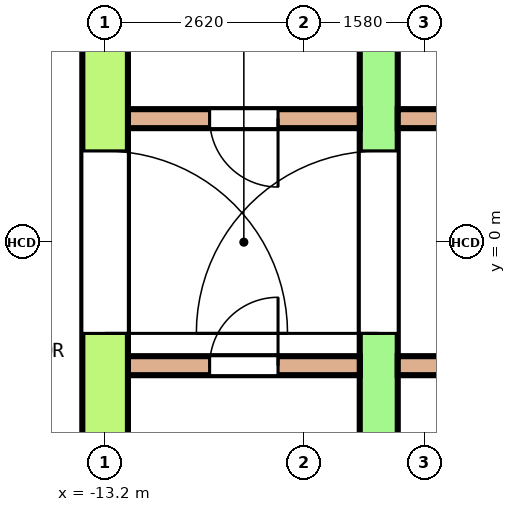
"""IFC4 building model, lengths in metres.
Left out: names, types, materials, properties, quantities, classifications, styles, units other than length and angle.
Written with IfcOpenShell. Run it as: python <this file> out.ifc"""

import sys

from ifc_helpers import new_model, si_unit, direction, frame, frame_2d, origin, place, context, subcontext, project, spatial, polyline, rectangle, outline, extrude, element, fill, save


model = new_model("IFC4")
c1 = context("Model", 3, precision=1e-05, world=origin(), true_north=direction((0.0, 1.0)))
c2 = subcontext(c1, "Body", "Model", "MODEL_VIEW")
j1 = project(units=[si_unit("LENGTHUNIT", "METRE"), si_unit("PLANEANGLEUNIT", "RADIAN")], contexts=[c1])
p1 = place(None, origin())
s1 = spatial("IfcSite", under=j1, at=p1, CompositionType="ELEMENT")
p2 = place(p1, origin())
s2 = spatial("IfcBuilding", under=s1, at=p2, CompositionType="ELEMENT")
p3 = place(p2, frame((0.0, 0.0, 241.4)))
s3 = spatial("IfcBuildingStorey", under=s2, at=p3, CompositionType="ELEMENT", Elevation=241.4)
p4 = place(p3, frame((-23.479, -2.134, 0.0), z_axis=(0.0, 0.0, 1.0), x_axis=(0.500004117472, -0.866023026548, 0.0)))
e1 = element("IfcWall", 1, at=p4, inside=s3, PredefinedType="SOLIDWALL", context=c2, shape_type="SweptSolid", body=[
    extrude(outline(polyline([(-0.027, -0.1), (1.017, -0.1), (2.061, -0.1), (3.105, -0.1), (4.149, -0.1), (5.193, -0.1), (6.237, -0.1), (7.281, -0.1), (8.325, -0.1), (9.369, -0.1), (10.414, -0.1), (11.458, -0.1), (12.501, -0.1), (13.546, -0.1), (14.59, -0.1), (15.634, -0.1), (16.678, -0.1), (17.722, -0.1), (18.766, -0.1), (19.81, -0.1), (19.756, 0.1), (18.718, 0.1), (17.679, 0.1), (16.641, 0.1), (15.603, 0.1), (14.564, 0.1), (13.526, 0.1), (12.488, 0.1), (11.449, 0.1), (10.411, 0.1), (9.372, 0.1), (8.334, 0.1), (7.295, 0.1), (6.257, 0.1), (5.219, 0.1), (4.18, 0.1), (3.142, 0.1), (2.104, 0.1), (1.065, 0.1), (0.027, 0.1), (-0.027, -0.1)])), origin(), (0.0, 0.0, 1.0), 3.7),
])
p5 = place(p4, frame((0.528, 0.0, 0.1)))
e2 = element("IfcOpeningElement", 2, at=p5, cuts=e1, PredefinedType="OPENING", context=c2, shape_type="SweptSolid", body=[
    extrude(rectangle(XDim=2.9, YDim=2.65, at=frame_2d((1.45, 1.325))), frame((0.0, 0.11, 0.0), z_axis=(0.0, -1.0, 0.0), x_axis=(1.0, 0.0, 0.0)), (0.0, 0.0, 1.0), 0.22),
])
p6 = place(p4, frame((4.485, 0.0, 0.1)))
e3 = element("IfcOpeningElement", 3, at=p6, cuts=e1, PredefinedType="OPENING", context=c2, shape_type="SweptSolid", body=[
    extrude(rectangle(XDim=2.9, YDim=2.65, at=frame_2d((1.45, 1.325))), frame((0.0, 0.11, 0.0), z_axis=(0.0, -1.0, 0.0), x_axis=(1.0, 0.0, 0.0)), (0.0, 0.0, 1.0), 0.22),
])
p7 = place(p4, frame((8.991, 0.0, 0.0)))
e4 = element("IfcOpeningElement", 4, at=p7, cuts=e1, PredefinedType="OPENING", context=c2, shape_type="SweptSolid", body=[
    extrude(rectangle(XDim=1.8, YDim=2.4, at=frame_2d((0.9, 1.2))), frame((0.0, 0.11, 0.0), z_axis=(0.0, -1.0, 0.0), x_axis=(1.0, 0.0, 0.0)), (0.0, 0.0, 1.0), 0.22),
])
p8 = place(p4, frame((8.991, 0.0, 2.55)))
e5 = element("IfcOpeningElement", 5, at=p8, cuts=e1, PredefinedType="OPENING", context=c2, shape_type="SweptSolid", body=[
    extrude(rectangle(XDim=1.8, YDim=0.2, at=frame_2d((0.9, 0.1))), frame((0.0, 0.11, 0.0), z_axis=(0.0, -1.0, 0.0), x_axis=(1.0, 0.0, 0.0)), (0.0, 0.0, 1.0), 0.22),
])
p9 = place(p4, frame((12.398, 0.0, 0.1)))
e6 = element("IfcOpeningElement", 6, at=p9, cuts=e1, PredefinedType="OPENING", context=c2, shape_type="SweptSolid", body=[
    extrude(rectangle(XDim=2.9, YDim=2.65, at=frame_2d((1.45, 1.325))), frame((0.0, 0.11, 0.0), z_axis=(0.0, -1.0, 0.0), x_axis=(1.0, 0.0, 0.0)), (0.0, 0.0, 1.0), 0.22),
])
p10 = place(p4, frame((16.355, 0.0, 0.1)))
e7 = element("IfcOpeningElement", 7, at=p10, cuts=e1, PredefinedType="OPENING", context=c2, shape_type="SweptSolid", body=[
    extrude(rectangle(XDim=2.9, YDim=2.65, at=frame_2d((1.45, 1.325))), frame((0.0, 0.11, 0.0), z_axis=(0.0, -1.0, 0.0), x_axis=(1.0, 0.0, 0.0)), (0.0, 0.0, 1.0), 0.22),
])
p11 = place(p3, frame((-13.2, -7.8, 0.0), z_axis=(0.0, 0.0, 1.0), x_axis=(0.0, 1.0, 0.0)))
e8 = element("IfcWall", 8, at=p11, inside=s3, PredefinedType="SHEAR", context=c2, shape_type="SweptSolid", body=[
    extrude(rectangle(XDim=15.6, YDim=0.6, at=frame_2d((7.8, 0.0))), origin(), (0.0, 0.0, 1.0), 3.7),
])
p12 = place(p11, frame((6.6, 0.0, 0.0)))
e9 = element("IfcOpeningElement", 9, at=p12, cuts=e8, PredefinedType="OPENING", context=c2, shape_type="SweptSolid", body=[
    extrude(rectangle(XDim=2.4, YDim=2.1, at=frame_2d((1.2, 1.05))), frame((0.0, 0.31, 0.0), z_axis=(0.0, -1.0, 0.0), x_axis=(1.0, 0.0, 0.0)), (0.0, 0.0, 1.0), 0.62),
])
p13 = place(p11, frame((13.5, 0.0, 0.0)))
e10 = element("IfcOpeningElement", 10, at=p13, cuts=e8, PredefinedType="OPENING", context=c2, shape_type="SweptSolid", body=[
    extrude(rectangle(XDim=1.2, YDim=2.1, at=frame_2d((0.6, 1.05))), frame((0.0, 0.31, 0.0), z_axis=(0.0, -1.0, 0.0), x_axis=(1.0, 0.0, 0.0)), (0.0, 0.0, 1.0), 0.62),
])
p14 = place(p11, frame((0.9, 0.0, 0.0)))
e11 = element("IfcOpeningElement", 11, at=p14, cuts=e8, PredefinedType="OPENING", context=c2, shape_type="SweptSolid", body=[
    extrude(rectangle(XDim=1.2, YDim=2.1, at=frame_2d((0.6, 1.05))), frame((0.0, 0.31, 0.0), z_axis=(0.0, -1.0, 0.0), x_axis=(1.0, 0.0, 0.0)), (0.0, 0.0, 1.0), 0.62),
])
p15 = place(p3, frame((-9.6, -7.8, 0.0), z_axis=(0.0, 0.0, 1.0), x_axis=(0.0, 1.0, 0.0)))
e12 = element("IfcWall", 12, at=p15, inside=s3, PredefinedType="SHEAR", context=c2, shape_type="SweptSolid", body=[
    extrude(rectangle(XDim=15.6, YDim=0.5, at=frame_2d((7.8, 0.0))), origin(), (0.0, 0.0, 1.0), 3.7),
])
p16 = place(p15, frame((6.6, 0.0, 0.0)))
e13 = element("IfcOpeningElement", 13, at=p16, cuts=e12, PredefinedType="OPENING", context=c2, shape_type="SweptSolid", body=[
    extrude(rectangle(XDim=2.4, YDim=2.1, at=frame_2d((1.2, 1.05))), frame((0.0, 0.26, 0.0), z_axis=(0.0, -1.0, 0.0), x_axis=(1.0, 0.0, 0.0)), (0.0, 0.0, 1.0), 0.52),
])
p17 = place(p15, frame((13.5, 0.0, 0.0)))
e14 = element("IfcOpeningElement", 14, at=p17, cuts=e12, PredefinedType="OPENING", context=c2, shape_type="SweptSolid", body=[
    extrude(rectangle(XDim=1.2, YDim=2.1, at=frame_2d((0.6, 1.05))), frame((0.0, 0.26, 0.0), z_axis=(0.0, -1.0, 0.0), x_axis=(1.0, 0.0, 0.0)), (0.0, 0.0, 1.0), 0.52),
])
p18 = place(p15, frame((0.9, 0.0, 0.0)))
e15 = element("IfcOpeningElement", 15, at=p18, cuts=e12, PredefinedType="OPENING", context=c2, shape_type="SweptSolid", body=[
    extrude(rectangle(XDim=1.2, YDim=2.1, at=frame_2d((0.6, 1.05))), frame((0.0, 0.26, 0.0), z_axis=(0.0, -1.0, 0.0), x_axis=(1.0, 0.0, 0.0)), (0.0, 0.0, 1.0), 0.52),
])
p19 = place(p3, frame((-12.9, 1.625, 0.0), z_axis=(0.0, 0.0, 1.0), x_axis=(1.0, 0.0, 0.0)))
e16 = element("IfcWall", 16, at=p19, inside=s3, PredefinedType="SOLIDWALL", context=c2, shape_type="SweptSolid", body=[
    extrude(rectangle(XDim=3.05, YDim=0.25, at=frame_2d((1.525, 0.0))), origin(), (0.0, 0.0, 1.0), 3.7),
])
p20 = place(p19, frame((1.075, 0.0, 0.0)))
e17 = element("IfcOpeningElement", 17, at=p20, cuts=e16, PredefinedType="OPENING", context=c2, shape_type="SweptSolid", body=[
    extrude(rectangle(XDim=0.9, YDim=2.1, at=frame_2d((0.45, 1.05))), frame((0.0, 0.135, 0.0), z_axis=(0.0, -1.0, 0.0), x_axis=(1.0, 0.0, 0.0)), (0.0, 0.0, 1.0), 0.27),
])
p21 = place(p3, frame((-9.35, 1.625, 0.0), z_axis=(0.0, 0.0, 1.0), x_axis=(1.0, 0.0, 0.0)))
e18 = element("IfcWall", 18, at=p21, inside=s3, PredefinedType="SOLIDWALL", context=c2, shape_type="SweptSolid", body=[
    extrude(rectangle(XDim=18.7, YDim=0.25, at=frame_2d((9.35, 0.0))), origin(), (0.0, 0.0, 1.0), 3.7),
])
p22 = place(p21, frame((7.65, 0.0, 0.0)))
e19 = element("IfcOpeningElement", 19, at=p22, cuts=e18, PredefinedType="OPENING", context=c2, shape_type="SweptSolid", body=[
    extrude(rectangle(XDim=1.1, YDim=2.1, at=frame_2d((0.55, 1.05))), frame((0.0, 0.135, 0.0), z_axis=(0.0, -1.0, 0.0), x_axis=(1.0, 0.0, 0.0)), (0.0, 0.0, 1.0), 0.27),
])
p23 = place(p21, frame((9.95, 0.0, 0.0)))
e20 = element("IfcOpeningElement", 20, at=p23, cuts=e18, PredefinedType="OPENING", context=c2, shape_type="SweptSolid", body=[
    extrude(rectangle(XDim=1.1, YDim=2.1, at=frame_2d((0.55, 1.05))), frame((0.0, 0.135, 0.0), z_axis=(0.0, -1.0, 0.0), x_axis=(1.0, 0.0, 0.0)), (0.0, 0.0, 1.0), 0.27),
])
p24 = place(p21, frame((12.4, 0.0, 0.0)))
e21 = element("IfcOpeningElement", 21, at=p24, cuts=e18, PredefinedType="OPENING", context=c2, shape_type="SweptSolid", body=[
    extrude(rectangle(XDim=1.1, YDim=2.1, at=frame_2d((0.55, 1.05))), frame((0.0, 0.135, 0.0), z_axis=(0.0, -1.0, 0.0), x_axis=(1.0, 0.0, 0.0)), (0.0, 0.0, 1.0), 0.27),
])
p25 = place(p21, frame((0.575, 0.0, 0.0)))
e22 = element("IfcOpeningElement", 22, at=p25, cuts=e18, PredefinedType="OPENING", context=c2, shape_type="SweptSolid", body=[
    extrude(rectangle(XDim=0.9, YDim=2.1, at=frame_2d((0.45, 1.05))), frame((0.0, 0.135, 0.0), z_axis=(0.0, -1.0, 0.0), x_axis=(1.0, 0.0, 0.0)), (0.0, 0.0, 1.0), 0.27),
])
p26 = place(p21, frame((2.919, 0.0, 0.0)))
e23 = element("IfcOpeningElement", 23, at=p26, cuts=e18, PredefinedType="OPENING", context=c2, shape_type="SweptSolid", body=[
    extrude(rectangle(XDim=0.9, YDim=2.1, at=frame_2d((0.45, 1.05))), frame((0.0, 0.135, 0.0), z_axis=(0.0, -1.0, 0.0), x_axis=(1.0, 0.0, 0.0)), (0.0, 0.0, 1.0), 0.27),
])
p27 = place(p21, frame((5.281, 0.0, 0.0)))
e24 = element("IfcOpeningElement", 24, at=p27, cuts=e18, PredefinedType="OPENING", context=c2, shape_type="SweptSolid", body=[
    extrude(rectangle(XDim=0.9, YDim=2.1, at=frame_2d((0.45, 1.05))), frame((0.0, 0.135, 0.0), z_axis=(0.0, -1.0, 0.0), x_axis=(1.0, 0.0, 0.0)), (0.0, 0.0, 1.0), 0.27),
])
p28 = place(p21, frame((14.9, 0.0, 0.0)))
e25 = element("IfcOpeningElement", 25, at=p28, cuts=e18, PredefinedType="OPENING", context=c2, shape_type="SweptSolid", body=[
    extrude(rectangle(XDim=0.9, YDim=2.1, at=frame_2d((0.45, 1.05))), frame((0.0, 0.135, 0.0), z_axis=(0.0, -1.0, 0.0), x_axis=(1.0, 0.0, 0.0)), (0.0, 0.0, 1.0), 0.27),
])
p29 = place(p21, frame((17.225, 0.0, 0.0)))
e26 = element("IfcOpeningElement", 26, at=p29, cuts=e18, PredefinedType="OPENING", context=c2, shape_type="SweptSolid", body=[
    extrude(rectangle(XDim=0.9, YDim=2.1, at=frame_2d((0.45, 1.05))), frame((0.0, 0.135, 0.0), z_axis=(0.0, -1.0, 0.0), x_axis=(1.0, 0.0, 0.0)), (0.0, 0.0, 1.0), 0.27),
])
p30 = place(p3, frame((-12.9, -1.625, 0.0), z_axis=(0.0, 0.0, 1.0), x_axis=(1.0, 0.0, 0.0)))
e27 = element("IfcWall", 27, at=p30, inside=s3, PredefinedType="SOLIDWALL", context=c2, shape_type="SweptSolid", body=[
    extrude(rectangle(XDim=3.05, YDim=0.25, at=frame_2d((1.525, 0.0))), origin(), (0.0, 0.0, 1.0), 3.7),
])
p31 = place(p30, frame((1.075, 0.0, 0.0)))
e28 = element("IfcOpeningElement", 28, at=p31, cuts=e27, PredefinedType="OPENING", context=c2, shape_type="SweptSolid", body=[
    extrude(rectangle(XDim=0.9, YDim=2.1, at=frame_2d((0.45, 1.05))), frame((0.0, 0.135, 0.0), z_axis=(0.0, -1.0, 0.0), x_axis=(1.0, 0.0, 0.0)), (0.0, 0.0, 1.0), 0.27),
])
p32 = place(p3, frame((-9.35, -1.625, 0.0), z_axis=(0.0, 0.0, 1.0), x_axis=(1.0, 0.0, 0.0)))
e29 = element("IfcWall", 29, at=p32, inside=s3, PredefinedType="SOLIDWALL", context=c2, shape_type="SweptSolid", body=[
    extrude(rectangle(XDim=18.7, YDim=0.25, at=frame_2d((9.35, 0.0))), origin(), (0.0, 0.0, 1.0), 3.7),
])
p33 = place(p32, frame((7.65, 0.0, 0.0)))
e30 = element("IfcOpeningElement", 30, at=p33, cuts=e29, PredefinedType="OPENING", context=c2, shape_type="SweptSolid", body=[
    extrude(rectangle(XDim=1.1, YDim=2.1, at=frame_2d((0.55, 1.05))), frame((0.0, 0.135, 0.0), z_axis=(0.0, -1.0, 0.0), x_axis=(1.0, 0.0, 0.0)), (0.0, 0.0, 1.0), 0.27),
])
p34 = place(p32, frame((9.95, 0.0, 0.0)))
e31 = element("IfcOpeningElement", 31, at=p34, cuts=e29, PredefinedType="OPENING", context=c2, shape_type="SweptSolid", body=[
    extrude(rectangle(XDim=1.1, YDim=2.1, at=frame_2d((0.55, 1.05))), frame((0.0, 0.135, 0.0), z_axis=(0.0, -1.0, 0.0), x_axis=(1.0, 0.0, 0.0)), (0.0, 0.0, 1.0), 0.27),
])
p35 = place(p32, frame((12.4, 0.0, 0.0)))
e32 = element("IfcOpeningElement", 32, at=p35, cuts=e29, PredefinedType="OPENING", context=c2, shape_type="SweptSolid", body=[
    extrude(rectangle(XDim=1.1, YDim=2.1, at=frame_2d((0.55, 1.05))), frame((0.0, 0.135, 0.0), z_axis=(0.0, -1.0, 0.0), x_axis=(1.0, 0.0, 0.0)), (0.0, 0.0, 1.0), 0.27),
])
p36 = place(p32, frame((0.575, 0.0, 0.0)))
e33 = element("IfcOpeningElement", 33, at=p36, cuts=e29, PredefinedType="OPENING", context=c2, shape_type="SweptSolid", body=[
    extrude(rectangle(XDim=0.9, YDim=2.1, at=frame_2d((0.45, 1.05))), frame((0.0, 0.135, 0.0), z_axis=(0.0, -1.0, 0.0), x_axis=(1.0, 0.0, 0.0)), (0.0, 0.0, 1.0), 0.27),
])
p37 = place(p32, frame((2.519, 0.0, 0.0)))
e34 = element("IfcOpeningElement", 34, at=p37, cuts=e29, PredefinedType="OPENING", context=c2, shape_type="SweptSolid", body=[
    extrude(rectangle(XDim=0.9, YDim=2.1, at=frame_2d((0.45, 1.05))), frame((0.0, 0.135, 0.0), z_axis=(0.0, -1.0, 0.0), x_axis=(1.0, 0.0, 0.0)), (0.0, 0.0, 1.0), 0.27),
])
p38 = place(p32, frame((4.881, 0.0, 0.0)))
e35 = element("IfcOpeningElement", 35, at=p38, cuts=e29, PredefinedType="OPENING", context=c2, shape_type="SweptSolid", body=[
    extrude(rectangle(XDim=0.9, YDim=2.1, at=frame_2d((0.45, 1.05))), frame((0.0, 0.135, 0.0), z_axis=(0.0, -1.0, 0.0), x_axis=(1.0, 0.0, 0.0)), (0.0, 0.0, 1.0), 0.27),
])
p39 = place(p32, frame((14.9, 0.0, 0.0)))
e36 = element("IfcOpeningElement", 36, at=p39, cuts=e29, PredefinedType="OPENING", context=c2, shape_type="SweptSolid", body=[
    extrude(rectangle(XDim=0.9, YDim=2.1, at=frame_2d((0.45, 1.05))), frame((0.0, 0.135, 0.0), z_axis=(0.0, -1.0, 0.0), x_axis=(1.0, 0.0, 0.0)), (0.0, 0.0, 1.0), 0.27),
])
p40 = place(p32, frame((17.225, 0.0, 0.0)))
e37 = element("IfcOpeningElement", 37, at=p40, cuts=e29, PredefinedType="OPENING", context=c2, shape_type="SweptSolid", body=[
    extrude(rectangle(XDim=0.9, YDim=2.1, at=frame_2d((0.45, 1.05))), frame((0.0, 0.135, 0.0), z_axis=(0.0, -1.0, 0.0), x_axis=(1.0, 0.0, 0.0)), (0.0, 0.0, 1.0), 0.27),
])
p41 = place(p16, origin())
e38 = element("IfcDoor", 38, at=p41, inside=s3, OperationType="DOUBLE_DOOR_SINGLE_SWING", PredefinedType="DOOR", context=c2, shape_type="SweptSolid", body=[
    extrude(rectangle(XDim=2.4, YDim=2.1, at=frame_2d((1.2, 1.05))), frame((0.0, 0.2, 0.0), z_axis=(0.0, -1.0, 0.0), x_axis=(1.0, 0.0, 0.0)), (0.0, 0.0, 1.0), 0.4),
])
fill(e13, e38)
p42 = place(p12, origin())
e39 = element("IfcDoor", 39, at=p42, inside=s3, OperationType="DOUBLE_DOOR_SINGLE_SWING", PredefinedType="DOOR", context=c2, shape_type="SweptSolid", body=[
    extrude(rectangle(XDim=2.4, YDim=2.1, at=frame_2d((1.2, 1.05))), frame((0.0, 0.25, 0.0), z_axis=(0.0, -1.0, 0.0), x_axis=(1.0, 0.0, 0.0)), (0.0, 0.0, 1.0), 0.5),
])
fill(e9, e39)
p43 = place(p20, origin())
e40 = element("IfcDoor", 40, at=p43, inside=s3, OperationType="SINGLE_SWING_RIGHT", PredefinedType="DOOR", context=c2, shape_type="SweptSolid", body=[
    extrude(rectangle(XDim=0.9, YDim=2.1, at=frame_2d((0.45, 1.05))), frame((0.0, 0.075, 0.0), z_axis=(0.0, -1.0, 0.0), x_axis=(1.0, 0.0, 0.0)), (0.0, 0.0, 1.0), 0.15),
])
fill(e17, e40)
p44 = place(p31, origin())
e41 = element("IfcDoor", 41, at=p44, inside=s3, OperationType="SINGLE_SWING_LEFT", PredefinedType="DOOR", context=c2, shape_type="SweptSolid", body=[
    extrude(rectangle(XDim=0.9, YDim=2.1, at=frame_2d((0.45, 1.05))), frame((0.0, 0.075, 0.0), z_axis=(0.0, -1.0, 0.0), x_axis=(1.0, 0.0, 0.0)), (0.0, 0.0, 1.0), 0.15),
])
fill(e28, e41)
save(model, sys.argv[1])
